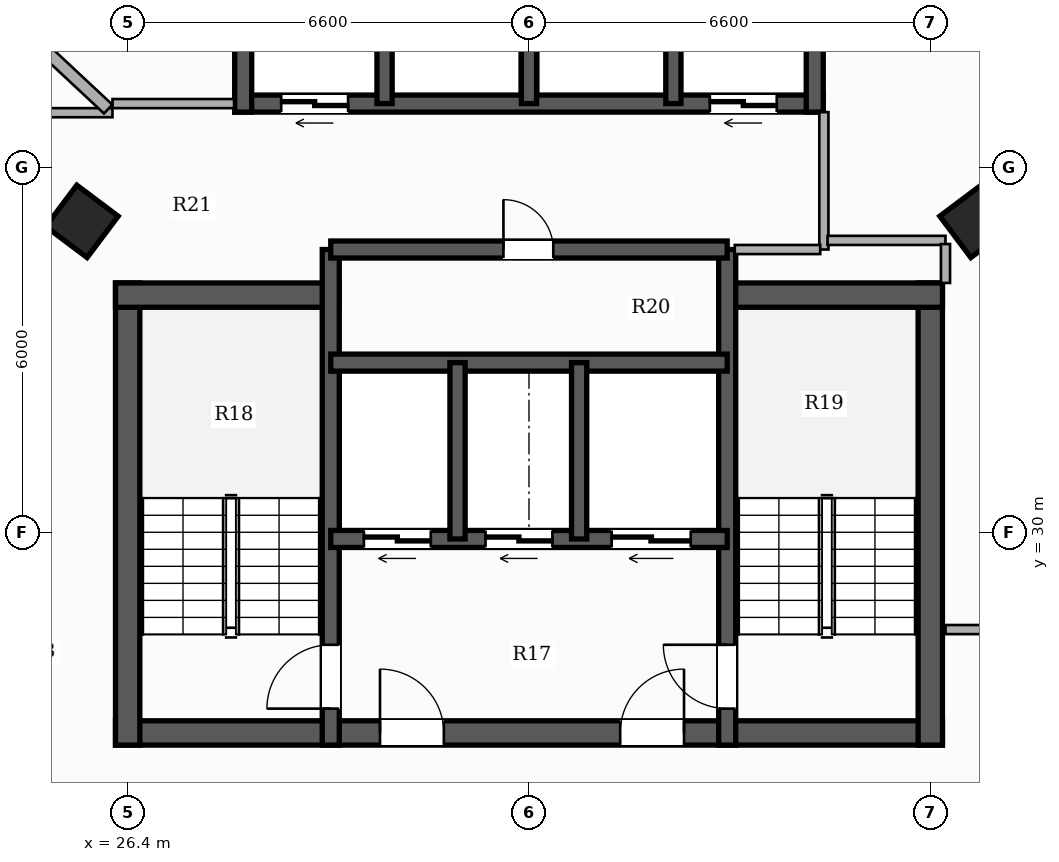
"""IFC4 building model, lengths in metres.
Left out: names, types, materials, properties, quantities, classifications, styles, units other than length and angle.
Written with IfcOpenShell. Run it as: python <this file> out.ifc"""

import sys

from ifc_helpers import new_model, si_unit, direction, frame, frame_2d, origin, origin_2d, place, context, subcontext, project, spatial, rectangle, hollow_rectangle, extrude, element, fill, save


model = new_model("IFC4")
c1 = context("Model", 3, precision=1e-05, world=origin(), true_north=direction((0.0, 1.0)))
c2 = subcontext(c1, "Body", "Model", "MODEL_VIEW")
j1 = project(units=[si_unit("LENGTHUNIT", "METRE"), si_unit("PLANEANGLEUNIT", "RADIAN")], contexts=[c1])
p1 = place(None, origin())
s1 = spatial("IfcSite", under=j1, at=p1, CompositionType="ELEMENT")
p2 = place(p1, origin())
s2 = spatial("IfcBuilding", under=s1, at=p2, CompositionType="ELEMENT")
p3 = place(p2, frame((0.0, 0.0, 139.7)))
s3 = spatial("IfcBuildingStorey", under=s2, at=p3, CompositionType="ELEMENT", Elevation=139.7)
p4 = place(p3, frame((26.2, 26.7, 0.0), z_axis=(0.0, 0.0, 1.0), x_axis=(1.0, 0.0, 0.0)))
e1 = element("IfcWall", 1, at=p4, inside=s3, PredefinedType="SHEAR", context=c2, shape_type="SweptSolid", body=[
    extrude(rectangle(XDim=13.6, YDim=0.4, at=frame_2d((6.8, 0.0))), origin(), (0.0, 0.0, 1.0), 3.3),
])
p5 = place(p4, frame((4.35, 0.0, 0.0)))
e2 = element("IfcOpeningElement", 2, at=p5, cuts=e1, PredefinedType="OPENING", context=c2, shape_type="SweptSolid", body=[
    extrude(rectangle(XDim=1.05, YDim=2.15, at=frame_2d((0.525, 1.075))), frame((0.0, 0.21, 0.0), z_axis=(0.0, -1.0, 0.0), x_axis=(1.0, 0.0, 0.0)), (0.0, 0.0, 1.0), 0.42),
])
p6 = place(p4, frame((8.3, 0.0, 0.0)))
e3 = element("IfcOpeningElement", 3, at=p6, cuts=e1, PredefinedType="OPENING", context=c2, shape_type="SweptSolid", body=[
    extrude(rectangle(XDim=1.05, YDim=2.15, at=frame_2d((0.525, 1.075))), frame((0.0, 0.21, 0.0), z_axis=(0.0, -1.0, 0.0), x_axis=(1.0, 0.0, 0.0)), (0.0, 0.0, 1.0), 0.42),
])
p7 = place(p3, frame((26.4, 26.5, 0.0), z_axis=(0.0, 0.0, 1.0), x_axis=(0.0, 1.0, 0.0)))
e4 = element("IfcWall", 4, at=p7, inside=s3, PredefinedType="SHEAR", context=c2, shape_type="SweptSolid", body=[
    extrude(rectangle(XDim=7.6, YDim=0.4, at=frame_2d((3.8, 0.0))), origin(), (0.0, 0.0, 1.0), 3.3),
])
p8 = place(p3, frame((26.2, 33.9, 0.0), z_axis=(0.0, 0.0, 1.0), x_axis=(1.0, 0.0, 0.0)))
e5 = element("IfcWall", 5, at=p8, inside=s3, PredefinedType="SHEAR", context=c2, shape_type="SweptSolid", body=[
    extrude(rectangle(XDim=3.68, YDim=0.4, at=frame_2d((1.84, 0.0))), origin(), (0.0, 0.0, 1.0), 3.3),
])
p9 = place(p3, frame((39.6, 26.5, 0.0), z_axis=(0.0, 0.0, 1.0), x_axis=(0.0, 1.0, 0.0)))
e6 = element("IfcWall", 6, at=p9, inside=s3, PredefinedType="SHEAR", context=c2, shape_type="SweptSolid", body=[
    extrude(rectangle(XDim=7.6, YDim=0.4, at=frame_2d((3.8, 0.0))), origin(), (0.0, 0.0, 1.0), 3.3),
])
p10 = place(p3, frame((36.12, 33.9, 0.0), z_axis=(0.0, 0.0, 1.0), x_axis=(1.0, 0.0, 0.0)))
e7 = element("IfcWall", 7, at=p10, inside=s3, PredefinedType="SHEAR", context=c2, shape_type="SweptSolid", body=[
    extrude(rectangle(XDim=3.68, YDim=0.4, at=frame_2d((1.84, 0.0))), origin(), (0.0, 0.0, 1.0), 3.3),
])
p11 = place(p3, frame((29.74, 26.5, 0.0), z_axis=(0.0, 0.0, 1.0), x_axis=(0.0, 1.0, 0.0)))
e8 = element("IfcWall", 8, at=p11, inside=s3, PredefinedType="SHEAR", context=c2, shape_type="SweptSolid", body=[
    extrude(rectangle(XDim=8.15, YDim=0.28, at=frame_2d((4.075, 0.0))), origin(), (0.0, 0.0, 1.0), 3.3),
])
p12 = place(p11, frame((0.6, 0.0, 0.0)))
e9 = element("IfcOpeningElement", 9, at=p12, cuts=e8, PredefinedType="OPENING", context=c2, shape_type="SweptSolid", body=[
    extrude(rectangle(XDim=1.05, YDim=2.15, at=frame_2d((0.525, 1.075))), frame((0.0, 0.15, 0.0), z_axis=(0.0, -1.0, 0.0), x_axis=(1.0, 0.0, 0.0)), (0.0, 0.0, 1.0), 0.3),
])
p13 = place(p3, frame((36.26, 26.5, 0.0), z_axis=(0.0, 0.0, 1.0), x_axis=(0.0, 1.0, 0.0)))
e10 = element("IfcWall", 10, at=p13, inside=s3, PredefinedType="SHEAR", context=c2, shape_type="SweptSolid", body=[
    extrude(rectangle(XDim=8.15, YDim=0.28, at=frame_2d((4.075, 0.0))), origin(), (0.0, 0.0, 1.0), 3.3),
])
p14 = place(p13, frame((0.6, 0.0, 0.0)))
e11 = element("IfcOpeningElement", 11, at=p14, cuts=e10, PredefinedType="OPENING", context=c2, shape_type="SweptSolid", body=[
    extrude(rectangle(XDim=1.05, YDim=2.15, at=frame_2d((0.525, 1.075))), frame((0.0, 0.15, 0.0), z_axis=(0.0, -1.0, 0.0), x_axis=(1.0, 0.0, 0.0)), (0.0, 0.0, 1.0), 0.3),
])
p15 = place(p3, frame((36.26, 29.89, 0.0), z_axis=(0.0, 0.0, 1.0), x_axis=(-1.0, 0.0, 0.0)))
e12 = element("IfcWall", 12, at=p15, inside=s3, PredefinedType="SHEAR", context=c2, shape_type="SweptSolid", body=[
    extrude(rectangle(XDim=6.52, YDim=0.28, at=frame_2d((3.26, 0.0))), origin(), (0.0, 0.0, 1.0), 3.3),
])
p16 = place(p15, frame((4.875, 0.0, 0.0)))
e13 = element("IfcOpeningElement", 13, at=p16, cuts=e12, PredefinedType="OPENING", context=c2, shape_type="SweptSolid", body=[
    extrude(rectangle(XDim=1.1, YDim=2.2, at=frame_2d((0.55, 1.1))), frame((0.0, 0.15, 0.0), z_axis=(0.0, -1.0, 0.0), x_axis=(1.0, 0.0, 0.0)), (0.0, 0.0, 1.0), 0.3),
])
p17 = place(p15, frame((2.875, 0.0, 0.0)))
e14 = element("IfcOpeningElement", 14, at=p17, cuts=e12, PredefinedType="OPENING", context=c2, shape_type="SweptSolid", body=[
    extrude(rectangle(XDim=1.1, YDim=2.2, at=frame_2d((0.55, 1.1))), frame((0.0, 0.15, 0.0), z_axis=(0.0, -1.0, 0.0), x_axis=(1.0, 0.0, 0.0)), (0.0, 0.0, 1.0), 0.3),
])
p18 = place(p15, frame((0.6, 0.0, 0.0)))
e15 = element("IfcOpeningElement", 15, at=p18, cuts=e12, PredefinedType="OPENING", context=c2, shape_type="SweptSolid", body=[
    extrude(rectangle(XDim=1.3, YDim=2.2, at=frame_2d((0.65, 1.1))), frame((0.0, 0.15, 0.0), z_axis=(0.0, -1.0, 0.0), x_axis=(1.0, 0.0, 0.0)), (0.0, 0.0, 1.0), 0.3),
])
p19 = place(p3, frame((29.74, 32.79, 0.0), z_axis=(0.0, 0.0, 1.0), x_axis=(1.0, 0.0, 0.0)))
e16 = element("IfcWall", 16, at=p19, inside=s3, PredefinedType="SHEAR", context=c2, shape_type="SweptSolid", body=[
    extrude(rectangle(XDim=6.52, YDim=0.28, at=frame_2d((3.26, 0.0))), origin(), (0.0, 0.0, 1.0), 3.3),
])
for number, where, z_axis, x_axis in (
    (17, (31.825, 29.89, 0.0), (0.0, 0.0, 1.0), (0.0, 1.0, 0.0)),
    (18, (33.825, 29.89, 0.0), (0.0, 0.0, 1.0), (0.0, 1.0, 0.0)),
):
    element("IfcWall", number, at=place(p3, frame(where, z_axis=z_axis, x_axis=x_axis)), inside=s3, PredefinedType="SHEAR", context=c2, shape_type="SweptSolid", body=[
        extrude(rectangle(XDim=2.9, YDim=0.25, at=frame_2d((1.45, 0.0))), origin(), (0.0, 0.0, 1.0), 3.3),
    ])
p20 = place(p3, frame((29.74, 34.65, 0.0), z_axis=(0.0, 0.0, 1.0), x_axis=(1.0, 0.0, 0.0)))
e19 = element("IfcWall", 19, at=p20, inside=s3, PredefinedType="SHEAR", context=c2, shape_type="SweptSolid", body=[
    extrude(rectangle(XDim=6.52, YDim=0.28, at=frame_2d((3.26, 0.0))), origin(), (0.0, 0.0, 1.0), 3.3),
])
p21 = place(p20, frame((2.84, 0.0, 0.0)))
e20 = element("IfcOpeningElement", 20, at=p21, cuts=e19, PredefinedType="OPENING", context=c2, shape_type="SweptSolid", body=[
    extrude(rectangle(XDim=0.82, YDim=2.1, at=frame_2d((0.41, 1.05))), frame((0.0, 0.15, 0.0), z_axis=(0.0, -1.0, 0.0), x_axis=(1.0, 0.0, 0.0)), (0.0, 0.0, 1.0), 0.3),
])
p22 = place(p3, frame((37.84, 37.05, 0.0), z_axis=(0.0, 0.0, 1.0), x_axis=(-1.0, 0.0, 0.0)))
e21 = element("IfcWall", 21, at=p22, inside=s3, PredefinedType="SHEAR", context=c2, shape_type="SweptSolid", body=[
    extrude(rectangle(XDim=9.68, YDim=0.28, at=frame_2d((4.84, 0.0))), origin(), (0.0, 0.0, 1.0), 3.3),
])
p23 = place(p22, frame((7.815, 0.0, 0.0)))
e22 = element("IfcOpeningElement", 22, at=p23, cuts=e21, PredefinedType="OPENING", context=c2, shape_type="SweptSolid", body=[
    extrude(rectangle(XDim=1.1, YDim=2.2, at=frame_2d((0.55, 1.1))), frame((0.0, 0.15, 0.0), z_axis=(0.0, -1.0, 0.0), x_axis=(1.0, 0.0, 0.0)), (0.0, 0.0, 1.0), 0.3),
])
p24 = place(p22, frame((0.765, 0.0, 0.0)))
e23 = element("IfcOpeningElement", 23, at=p24, cuts=e21, PredefinedType="OPENING", context=c2, shape_type="SweptSolid", body=[
    extrude(rectangle(XDim=1.1, YDim=2.2, at=frame_2d((0.55, 1.1))), frame((0.0, 0.15, 0.0), z_axis=(0.0, -1.0, 0.0), x_axis=(1.0, 0.0, 0.0)), (0.0, 0.0, 1.0), 0.3),
])
for number, where, z_axis, x_axis in (
    (24, (28.3, 36.91, 0.0), (0.0, 0.0, 1.0), (0.0, 1.0, 0.0)),
    (25, (37.7, 36.91, 0.0), (0.0, 0.0, 1.0), (0.0, 1.0, 0.0)),
):
    element("IfcWall", number, at=place(p3, frame(where, z_axis=z_axis, x_axis=x_axis)), inside=s3, PredefinedType="SHEAR", context=c2, shape_type="SweptSolid", body=[
        extrude(rectangle(XDim=2.83, YDim=0.28, at=frame_2d((1.415, 0.0))), origin(), (0.0, 0.0, 1.0), 3.3),
    ])
for number, where, z_axis, x_axis in (
    (26, (30.625, 37.05, 0.0), (0.0, 0.0, 1.0), (0.0, 1.0, 0.0)),
    (27, (33.0, 37.05, 0.0), (0.0, 0.0, 1.0), (0.0, 1.0, 0.0)),
    (28, (35.375, 37.05, 0.0), (0.0, 0.0, 1.0), (0.0, 1.0, 0.0)),
):
    element("IfcWall", number, at=place(p3, frame(where, z_axis=z_axis, x_axis=x_axis)), inside=s3, PredefinedType="SHEAR", context=c2, shape_type="SweptSolid", body=[
        extrude(rectangle(XDim=2.55, YDim=0.25, at=frame_2d((1.275, 0.0))), origin(), (0.0, 0.0, 1.0), 3.3),
    ])
for number, where, z_axis, x_axis in (
    (29, (25.648, 35.113, 0.0), (0.0, 0.0, 1.0), (0.6, 0.8, 0.0)),
    (30, (40.352, 35.113, 0.0), (0.0, 0.0, 1.0), (-0.6, 0.8, 0.0)),
):
    element("IfcColumn", number, at=place(p3, frame(where, z_axis=z_axis, x_axis=x_axis)), inside=s3, PredefinedType="COLUMN", context=c2, shape_type="SweptSolid", body=[
        extrude(hollow_rectangle(XDim=0.85, YDim=0.85, WallThickness=0.028, at=origin_2d()), origin(), (0.0, 0.0, 1.0), 3.3),
    ])
p25 = place(p3, frame((37.85, 34.65, 0.0), z_axis=(0.0, 0.0, 1.0), x_axis=(0.0, 1.0, 0.0)))
e31 = element("IfcWall", 31, at=p25, inside=s3, PredefinedType="PARTITIONING", context=c2, shape_type="SweptSolid", body=[
    extrude(rectangle(XDim=2.26, YDim=0.15, at=frame_2d((1.13, 0.0))), origin(), (0.0, 0.0, 1.0), 3.06),
])
p26 = place(p3, frame((36.385, 34.65, 0.0), z_axis=(0.0, 0.0, 1.0), x_axis=(1.0, 0.0, 0.0)))
e32 = element("IfcWall", 32, at=p26, inside=s3, PredefinedType="PARTITIONING", context=c2, shape_type="SweptSolid", body=[
    extrude(rectangle(XDim=1.405, YDim=0.15, at=frame_2d((0.703, 0.0))), origin(), (0.0, 0.0, 1.0), 2.425),
])
p27 = place(p3, frame((23.56, 36.9, 0.0), z_axis=(0.0, 0.0, 1.0), x_axis=(1.0, 0.0, 0.0)))
e33 = element("IfcWall", 33, at=p27, inside=s3, PredefinedType="PARTITIONING", context=c2, shape_type="SweptSolid", body=[
    extrude(rectangle(XDim=2.59, YDim=0.15, at=frame_2d((1.295, 0.0))), origin(), (0.0, 0.0, 1.0), 2.413),
])
p28 = place(p3, frame((39.85, 28.4, 0.0), z_axis=(0.0, 0.0, 1.0), x_axis=(1.0, 0.0, 0.0)))
e34 = element("IfcWall", 34, at=p28, inside=s3, PredefinedType="PARTITIONING", context=c2, shape_type="SweptSolid", body=[
    extrude(rectangle(XDim=2.5, YDim=0.15, at=frame_2d((1.25, 0.0))), origin(), (0.0, 0.0, 1.0), 2.721),
])
p29 = place(p3, frame((26.15, 37.05, 0.0), z_axis=(0.0, 0.0, 1.0), x_axis=(1.0, 0.0, 0.0)))
e35 = element("IfcWall", 35, at=p29, inside=s3, PredefinedType="PARTITIONING", context=c2, shape_type="SweptSolid", body=[
    extrude(rectangle(XDim=2.0, YDim=0.15, at=frame_2d((1.0, 0.0))), origin(), (0.0, 0.0, 1.0), 2.413),
])
p30 = place(p3, frame((37.91, 34.8, 0.0), z_axis=(0.0, 0.0, 1.0), x_axis=(1.0, 0.0, 0.0)))
e36 = element("IfcWall", 36, at=p30, inside=s3, PredefinedType="PARTITIONING", context=c2, shape_type="SweptSolid", body=[
    extrude(rectangle(XDim=1.94, YDim=0.15, at=frame_2d((0.97, 0.0))), origin(), (0.0, 0.0, 1.0), 2.721),
])
p31 = place(p3, frame((39.85, 34.74, 0.0), z_axis=(0.0, 0.0, 1.0), x_axis=(0.0, -1.0, 0.0)))
e37 = element("IfcWall", 37, at=p31, inside=s3, PredefinedType="PARTITIONING", context=c2, shape_type="SweptSolid", body=[
    extrude(rectangle(XDim=0.64, YDim=0.15, at=frame_2d((0.32, 0.0))), origin(), (0.0, 0.0, 1.0), 2.721),
])
p32 = place(p3, frame((26.079, 36.96, 0.0), z_axis=(0.0, 0.0, 1.0), x_axis=(-0.730912649308, 0.682471024354, 0.0)))
e38 = element("IfcWall", 38, at=p32, inside=s3, PredefinedType="PARTITIONING", context=c2, shape_type="SweptSolid", body=[
    extrude(rectangle(XDim=3.074, YDim=0.2, at=frame_2d((1.537, 0.0))), origin(), (0.0, 0.0, 1.0), 2.413),
])
p33 = place(p12, origin())
e39 = element("IfcDoor", 39, at=p33, inside=s3, OperationType="SINGLE_SWING_LEFT", PredefinedType="DOOR", context=c2, shape_type="SweptSolid", body=[
    extrude(rectangle(XDim=1.05, YDim=2.15, at=frame_2d((0.525, 1.075))), frame((0.0, 0.025, 0.0), z_axis=(0.0, -1.0, 0.0), x_axis=(1.0, 0.0, 0.0)), (0.0, 0.0, 1.0), 0.05),
])
fill(e9, e39)
p34 = place(p14, origin())
e40 = element("IfcDoor", 40, at=p34, inside=s3, OperationType="SINGLE_SWING_RIGHT", PredefinedType="DOOR", context=c2, shape_type="SweptSolid", body=[
    extrude(rectangle(XDim=1.05, YDim=2.15, at=frame_2d((0.525, 1.075))), frame((0.0, 0.025, 0.0), z_axis=(0.0, -1.0, 0.0), x_axis=(1.0, 0.0, 0.0)), (0.0, 0.0, 1.0), 0.05),
])
fill(e11, e40)
p35 = place(p5, origin())
e41 = element("IfcDoor", 41, at=p35, inside=s3, OperationType="SINGLE_SWING_LEFT", PredefinedType="DOOR", context=c2, shape_type="SweptSolid", body=[
    extrude(rectangle(XDim=1.05, YDim=2.15, at=frame_2d((0.525, 1.075))), frame((0.0, 0.025, 0.0), z_axis=(0.0, -1.0, 0.0), x_axis=(1.0, 0.0, 0.0)), (0.0, 0.0, 1.0), 0.05),
])
fill(e2, e41)
p36 = place(p6, origin())
e42 = element("IfcDoor", 42, at=p36, inside=s3, OperationType="SINGLE_SWING_RIGHT", PredefinedType="DOOR", context=c2, shape_type="SweptSolid", body=[
    extrude(rectangle(XDim=1.05, YDim=2.15, at=frame_2d((0.525, 1.075))), frame((0.0, 0.025, 0.0), z_axis=(0.0, -1.0, 0.0), x_axis=(1.0, 0.0, 0.0)), (0.0, 0.0, 1.0), 0.05),
])
fill(e3, e42)
p37 = place(p16, origin())
e43 = element("IfcDoor", 43, at=p37, inside=s3, OperationType="DOUBLE_DOOR_SLIDING", PredefinedType="DOOR", context=c2, shape_type="SweptSolid", body=[
    extrude(rectangle(XDim=1.1, YDim=2.2, at=frame_2d((0.55, 1.1))), frame((0.0, 0.025, 0.0), z_axis=(0.0, -1.0, 0.0), x_axis=(1.0, 0.0, 0.0)), (0.0, 0.0, 1.0), 0.05),
])
fill(e13, e43)
p38 = place(p17, origin())
e44 = element("IfcDoor", 44, at=p38, inside=s3, OperationType="DOUBLE_DOOR_SLIDING", PredefinedType="DOOR", context=c2, shape_type="SweptSolid", body=[
    extrude(rectangle(XDim=1.1, YDim=2.2, at=frame_2d((0.55, 1.1))), frame((0.0, 0.025, 0.0), z_axis=(0.0, -1.0, 0.0), x_axis=(1.0, 0.0, 0.0)), (0.0, 0.0, 1.0), 0.05),
])
fill(e14, e44)
p39 = place(p18, origin())
e45 = element("IfcDoor", 45, at=p39, inside=s3, OperationType="DOUBLE_DOOR_SLIDING", PredefinedType="DOOR", context=c2, shape_type="SweptSolid", body=[
    extrude(rectangle(XDim=1.3, YDim=2.2, at=frame_2d((0.65, 1.1))), frame((0.0, 0.025, 0.0), z_axis=(0.0, -1.0, 0.0), x_axis=(1.0, 0.0, 0.0)), (0.0, 0.0, 1.0), 0.05),
])
fill(e15, e45)
p40 = place(p23, origin())
e46 = element("IfcDoor", 46, at=p40, inside=s3, OperationType="DOUBLE_DOOR_SLIDING", PredefinedType="DOOR", context=c2, shape_type="SweptSolid", body=[
    extrude(rectangle(XDim=1.1, YDim=2.2, at=frame_2d((0.55, 1.1))), frame((0.0, 0.025, 0.0), z_axis=(0.0, -1.0, 0.0), x_axis=(1.0, 0.0, 0.0)), (0.0, 0.0, 1.0), 0.05),
])
fill(e22, e46)
p41 = place(p24, origin())
e47 = element("IfcDoor", 47, at=p41, inside=s3, OperationType="DOUBLE_DOOR_SLIDING", PredefinedType="DOOR", context=c2, shape_type="SweptSolid", body=[
    extrude(rectangle(XDim=1.1, YDim=2.2, at=frame_2d((0.55, 1.1))), frame((0.0, 0.025, 0.0), z_axis=(0.0, -1.0, 0.0), x_axis=(1.0, 0.0, 0.0)), (0.0, 0.0, 1.0), 0.05),
])
fill(e23, e47)
p42 = place(p21, origin())
e48 = element("IfcDoor", 48, at=p42, inside=s3, OperationType="SINGLE_SWING_LEFT", PredefinedType="DOOR", context=c2, shape_type="SweptSolid", body=[
    extrude(rectangle(XDim=0.82, YDim=2.1, at=frame_2d((0.41, 1.05))), frame((0.0, 0.025, 0.0), z_axis=(0.0, -1.0, 0.0), x_axis=(1.0, 0.0, 0.0)), (0.0, 0.0, 1.0), 0.05),
])
fill(e20, e48)
save(model, sys.argv[1])
